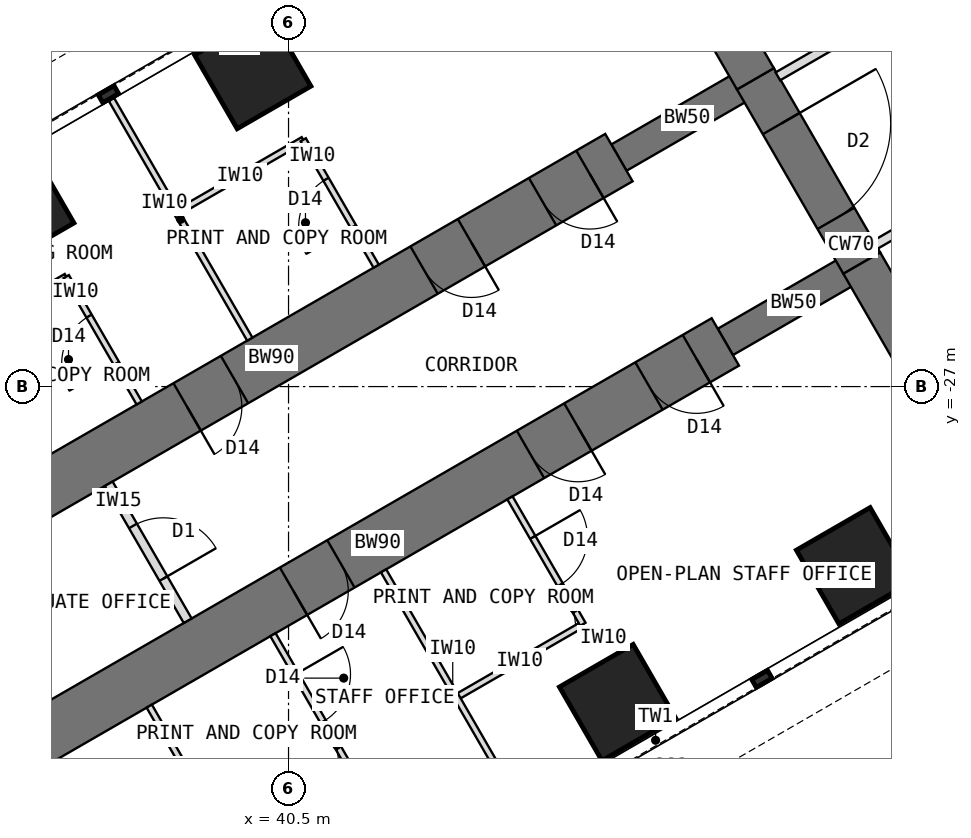
"""IFC4 building model, lengths in metres.
Left out: names, types, materials, properties, quantities, classifications, styles, units other than length and angle.
Written with IfcOpenShell. Run it as: python <this file> out.ifc"""

import sys

from ifc_helpers import new_model, si_unit, direction, frame, frame_2d, origin, origin_2d, place, context, subcontext, project, spatial, rectangle, extrude, element, fill, save


model = new_model("IFC4")
c1 = context("Model", 3, precision=1e-05, world=origin(), true_north=direction((0.0, 1.0)))
c2 = subcontext(c1, "Body", "Model", "MODEL_VIEW")
j1 = project(units=[si_unit("LENGTHUNIT", "METRE"), si_unit("PLANEANGLEUNIT", "RADIAN")], contexts=[c1])
p1 = place(None, origin())
s1 = spatial("IfcSite", under=j1, at=p1, CompositionType="ELEMENT")
p2 = place(p1, origin())
s2 = spatial("IfcBuilding", under=s1, at=p2, CompositionType="ELEMENT")
p3 = place(p2, frame((0.0, 0.0, 72.5)))
s3 = spatial("IfcBuildingStorey", under=s2, at=p3, CompositionType="ELEMENT", Elevation=72.5)
p4 = place(p3, frame((45.904, -18.0, 0.0), z_axis=(0.0, 0.0, 1.0), x_axis=(0.500024481964, -0.866011268655, 0.0)))
e1 = element("IfcWall", 1, at=p4, inside=s3, PredefinedType="SHEAR", context=c2, shape_type="SweptSolid", body=[
    extrude(rectangle(XDim=4.548, YDim=0.7, at=frame_2d((2.274, 0.0))), origin(), (0.0, 0.0, 1.0), 4.0),
])
p5 = place(p3, frame((48.178, -21.939, 0.0), z_axis=(0.0, 0.0, 1.0), x_axis=(0.500010275428, -0.866019471182, 0.0)))
e2 = element("IfcWall", 2, at=p5, inside=s3, PredefinedType="SHEAR", context=c2, shape_type="SweptSolid", body=[
    extrude(rectangle(XDim=3.5, YDim=0.7, at=frame_2d((1.75, 0.0))), origin(), (0.0, 0.0, 1.0), 4.0),
])
p6 = place(p5, frame((0.85, 0.0, 0.0)))
e3 = element("IfcOpeningElement", 3, at=p6, cuts=e2, PredefinedType="OPENING", context=c2, shape_type="SweptSolid", body=[
    extrude(rectangle(XDim=1.8, YDim=2.1, at=frame_2d((0.9, 1.05))), frame((0.0, 0.36, 0.0), z_axis=(0.0, -1.0, 0.0), x_axis=(1.0, 0.0, 0.0)), (0.0, 0.0, 1.0), 0.72),
])
p7 = place(p3, frame((49.928, -24.97, 0.0), z_axis=(0.0, 0.0, 1.0), x_axis=(0.499984222037, -0.866034513004, 0.0)))
e4 = element("IfcWall", 4, at=p7, inside=s3, PredefinedType="SHEAR", context=c2, shape_type="SweptSolid", body=[
    extrude(rectangle(XDim=4.548, YDim=0.7, at=frame_2d((2.274, 0.0))), origin(), (0.0, 0.0, 1.0), 4.0),
])
p8 = place(p3, frame((49.928, -24.97, 0.0), z_axis=(0.0, 0.0, 1.0), x_axis=(-0.866031863473, -0.499988811324, 0.0)))
e5 = element("IfcWall", 5, at=p8, inside=s3, PredefinedType="SHEAR", context=c2, shape_type="SweptSolid", body=[
    extrude(rectangle(XDim=2.592, YDim=0.5, at=frame_2d((1.296, 0.0))), origin(), (0.0, 0.0, 1.0), 4.0),
])
p9 = place(p3, frame((47.684, -26.266, 0.0), z_axis=(0.0, 0.0, 1.0), x_axis=(-0.866027579429, -0.499996231654, 0.0)))
e6 = element("IfcWall", 6, at=p9, inside=s3, PredefinedType="SHEAR", context=c2, shape_type="SweptSolid", body=[
    extrude(rectangle(XDim=13.2, YDim=0.9, at=frame_2d((6.6, 0.0))), origin(), (0.0, 0.0, 1.0), 4.0),
])
p10 = place(p9, frame((0.55, 0.0, 0.0)))
e7 = element("IfcOpeningElement", 7, at=p10, cuts=e6, PredefinedType="OPENING", context=c2, shape_type="SweptSolid", body=[
    extrude(rectangle(XDim=0.9, YDim=2.1, at=frame_2d((0.45, 1.05))), frame((0.0, 0.46, 0.0), z_axis=(0.0, -1.0, 0.0), x_axis=(1.0, 0.0, 0.0)), (0.0, 0.0, 1.0), 0.92),
])
p11 = place(p9, frame((2.8, 0.0, 0.0)))
e8 = element("IfcOpeningElement", 8, at=p11, cuts=e6, PredefinedType="OPENING", context=c2, shape_type="SweptSolid", body=[
    extrude(rectangle(XDim=0.9, YDim=2.1, at=frame_2d((0.45, 1.05))), frame((0.0, 0.46, 0.0), z_axis=(0.0, -1.0, 0.0), x_axis=(1.0, 0.0, 0.0)), (0.0, 0.0, 1.0), 0.92),
])
p12 = place(p9, frame((7.3, 0.0, 0.0)))
e9 = element("IfcOpeningElement", 9, at=p12, cuts=e6, PredefinedType="OPENING", context=c2, shape_type="SweptSolid", body=[
    extrude(rectangle(XDim=0.9, YDim=2.1, at=frame_2d((0.45, 1.05))), frame((0.0, 0.46, 0.0), z_axis=(0.0, -1.0, 0.0), x_axis=(1.0, 0.0, 0.0)), (0.0, 0.0, 1.0), 0.92),
])
p13 = place(p3, frame((48.178, -21.939, 0.0), z_axis=(0.0, 0.0, 1.0), x_axis=(-0.866072649678, -0.499918158782, 0.0)))
e10 = element("IfcWall", 10, at=p13, inside=s3, PredefinedType="SHEAR", context=c2, shape_type="SweptSolid", body=[
    extrude(rectangle(XDim=2.592, YDim=0.5, at=frame_2d((1.296, 0.0))), origin(), (0.0, 0.0, 1.0), 4.0),
])
p14 = place(p3, frame((45.934, -23.234, 0.0), z_axis=(0.0, 0.0, 1.0), x_axis=(-0.866019570528, -0.500010103361, 0.0)))
e11 = element("IfcWall", 11, at=p14, inside=s3, PredefinedType="SHEAR", context=c2, shape_type="SweptSolid", body=[
    extrude(rectangle(XDim=13.2, YDim=0.9, at=frame_2d((6.6, 0.0))), origin(), (0.0, 0.0, 1.0), 4.0),
])
p15 = place(p14, frame((0.55, 0.0, 0.0)))
e12 = element("IfcOpeningElement", 12, at=p15, cuts=e11, PredefinedType="OPENING", context=c2, shape_type="SweptSolid", body=[
    extrude(rectangle(XDim=0.9, YDim=2.1, at=frame_2d((0.45, 1.05))), frame((0.0, 0.46, 0.0), z_axis=(0.0, -1.0, 0.0), x_axis=(1.0, 0.0, 0.0)), (0.0, 0.0, 1.0), 0.92),
])
p16 = place(p14, frame((2.8, 0.0, 0.0)))
e13 = element("IfcOpeningElement", 13, at=p16, cuts=e11, PredefinedType="OPENING", context=c2, shape_type="SweptSolid", body=[
    extrude(rectangle(XDim=0.9, YDim=2.1, at=frame_2d((0.45, 1.05))), frame((0.0, 0.46, 0.0), z_axis=(0.0, -1.0, 0.0), x_axis=(1.0, 0.0, 0.0)), (0.0, 0.0, 1.0), 0.92),
])
p17 = place(p14, frame((7.3, 0.0, 0.0)))
e14 = element("IfcOpeningElement", 14, at=p17, cuts=e11, PredefinedType="OPENING", context=c2, shape_type="SweptSolid", body=[
    extrude(rectangle(XDim=0.9, YDim=2.1, at=frame_2d((0.45, 1.05))), frame((0.0, 0.46, 0.0), z_axis=(0.0, -1.0, 0.0), x_axis=(1.0, 0.0, 0.0)), (0.0, 0.0, 1.0), 0.92),
])
for number, where, z_axis, x_axis in (
    (15, (49.809, -29.946, 0.0), (0.0, 0.0, 1.0), (0.866, 0.5, 0.0)),
    (16, (45.912, -32.196, 0.0), (0.0, 0.0, 1.0), (0.866, 0.5, 0.0)),
    (17, (39.912, -21.804, 0.0), (0.0, 0.0, 1.0), (0.866, 0.5, 0.0)),
    (18, (36.014, -24.054, 0.0), (0.0, 0.0, 1.0), (0.866, 0.5, 0.0)),
):
    element("IfcColumn", number, at=place(p3, frame(where, z_axis=z_axis, x_axis=x_axis)), inside=s3, PredefinedType="COLUMN", context=c2, shape_type="SweptSolid", body=[
        extrude(rectangle(XDim=1.4, YDim=1.4, at=origin_2d()), origin(), (0.0, 0.0, 1.0), 4.0),
    ])
p18 = place(p3, frame((42.063, -30.03, 0.0), z_axis=(0.0, 0.0, 1.0), x_axis=(0.499982560684, -0.866035472144, 0.0)))
e19 = element("IfcWall", 19, at=p18, inside=s3, PredefinedType="PARTITIONING", context=c2, shape_type="SweptSolid", body=[
    extrude(rectangle(XDim=4.55, YDim=0.1, at=frame_2d((2.275, 0.0))), origin(), (0.0, 0.0, 1.0), 3.8),
])
p19 = place(p3, frame((45.342, -30.909, 0.0), z_axis=(0.0, 0.0, 1.0), x_axis=(-0.866050077142, -0.499957262057, 0.0)))
e20 = element("IfcWall", 20, at=p19, inside=s3, PredefinedType="PARTITIONING", context=c2, shape_type="SweptSolid", body=[
    extrude(rectangle(XDim=2.4, YDim=0.1, at=frame_2d((1.2, 0.0))), origin(), (0.0, 0.0, 1.0), 3.8),
])
p20 = place(p3, frame((44.141, -28.83, 0.0), z_axis=(0.0, 0.0, 1.0), x_axis=(0.500077600433, -0.865980596518, 0.0)))
e21 = element("IfcWall", 21, at=p20, inside=s3, PredefinedType="PARTITIONING", context=c2, shape_type="SweptSolid", body=[
    extrude(rectangle(XDim=2.4, YDim=0.1, at=frame_2d((1.2, 0.0))), origin(), (0.0, 0.0, 1.0), 3.8),
])
p21 = place(p20, frame((0.75, 0.0, 0.0)))
e22 = element("IfcOpeningElement", 22, at=p21, cuts=e21, PredefinedType="OPENING", context=c2, shape_type="SweptSolid", body=[
    extrude(rectangle(XDim=0.9, YDim=2.1, at=frame_2d((0.45, 1.05))), frame((0.0, 0.06, 0.0), z_axis=(0.0, -1.0, 0.0), x_axis=(1.0, 0.0, 0.0)), (0.0, 0.0, 1.0), 0.12),
])
p22 = place(p3, frame((40.244, -31.08, 0.0), z_axis=(0.0, 0.0, 1.0), x_axis=(0.500001309137, -0.866024647952, 0.0)))
e23 = element("IfcWall", 23, at=p22, inside=s3, PredefinedType="PARTITIONING", context=c2, shape_type="SweptSolid", body=[
    extrude(rectangle(XDim=2.4, YDim=0.1, at=frame_2d((1.2, 0.0))), origin(), (0.0, 0.0, 1.0), 3.8),
])
p23 = place(p22, frame((0.75, 0.0, 0.0)))
e24 = element("IfcOpeningElement", 24, at=p23, cuts=e23, PredefinedType="OPENING", context=c2, shape_type="SweptSolid", body=[
    extrude(rectangle(XDim=0.9, YDim=2.1, at=frame_2d((0.45, 1.05))), frame((0.0, 0.06, 0.0), z_axis=(0.0, -1.0, 0.0), x_axis=(1.0, 0.0, 0.0)), (0.0, 0.0, 1.0), 0.12),
])
p24 = place(p3, frame((38.209, -32.255, 0.0), z_axis=(0.0, 0.0, 1.0), x_axis=(0.500001309137, -0.866024647952, 0.0)))
e25 = element("IfcWall", 25, at=p24, inside=s3, PredefinedType="PARTITIONING", context=c2, shape_type="SweptSolid", body=[
    extrude(rectangle(XDim=2.4, YDim=0.1, at=frame_2d((1.2, 0.0))), origin(), (0.0, 0.0, 1.0), 3.8),
])
p25 = place(p3, frame((39.863, -26.22, 0.0), z_axis=(0.0, 0.0, 1.0), x_axis=(-0.500022803284, 0.866012237902, 0.0)))
e26 = element("IfcWall", 26, at=p25, inside=s3, PredefinedType="PARTITIONING", context=c2, shape_type="SweptSolid", body=[
    extrude(rectangle(XDim=4.55, YDim=0.1, at=frame_2d((2.275, 0.0))), origin(), (0.0, 0.0, 1.0), 3.8),
])
p26 = place(p3, frame((40.741, -22.941, 0.0), z_axis=(0.0, 0.0, 1.0), x_axis=(-0.865980596518, -0.500077600433, 0.0)))
e27 = element("IfcWall", 27, at=p26, inside=s3, PredefinedType="PARTITIONING", context=c2, shape_type="SweptSolid", body=[
    extrude(rectangle(XDim=2.4, YDim=0.1, at=frame_2d((1.2, 0.0))), origin(), (0.0, 0.0, 1.0), 3.8),
])
p27 = place(p3, frame((41.941, -25.02, 0.0), z_axis=(0.0, 0.0, 1.0), x_axis=(-0.499957262057, 0.866050077142, 0.0)))
e28 = element("IfcWall", 28, at=p27, inside=s3, PredefinedType="PARTITIONING", context=c2, shape_type="SweptSolid", body=[
    extrude(rectangle(XDim=2.4, YDim=0.1, at=frame_2d((1.2, 0.0))), origin(), (0.0, 0.0, 1.0), 3.8),
])
p28 = place(p27, frame((0.75, 0.0, 0.0)))
e29 = element("IfcOpeningElement", 29, at=p28, cuts=e28, PredefinedType="OPENING", context=c2, shape_type="SweptSolid", body=[
    extrude(rectangle(XDim=0.9, YDim=2.1, at=frame_2d((0.45, 1.05))), frame((0.0, 0.06, 0.0), z_axis=(0.0, -1.0, 0.0), x_axis=(1.0, 0.0, 0.0)), (0.0, 0.0, 1.0), 0.12),
])
p29 = place(p3, frame((36.844, -25.191, 0.0), z_axis=(0.0, 0.0, 1.0), x_axis=(-0.865980596518, -0.500077600433, 0.0)))
e30 = element("IfcWall", 30, at=p29, inside=s3, PredefinedType="PARTITIONING", context=c2, shape_type="SweptSolid", body=[
    extrude(rectangle(XDim=2.4, YDim=0.1, at=frame_2d((1.2, 0.0))), origin(), (0.0, 0.0, 1.0), 3.8),
])
p30 = place(p3, frame((38.044, -27.27, 0.0), z_axis=(0.0, 0.0, 1.0), x_axis=(-0.500033551112, 0.866006032174, 0.0)))
e31 = element("IfcWall", 31, at=p30, inside=s3, PredefinedType="PARTITIONING", context=c2, shape_type="SweptSolid", body=[
    extrude(rectangle(XDim=2.4, YDim=0.1, at=frame_2d((1.2, 0.0))), origin(), (0.0, 0.0, 1.0), 3.8),
])
p31 = place(p30, frame((0.75, 0.0, 0.0)))
e32 = element("IfcOpeningElement", 32, at=p31, cuts=e31, PredefinedType="OPENING", context=c2, shape_type="SweptSolid", body=[
    extrude(rectangle(XDim=0.9, YDim=2.1, at=frame_2d((0.45, 1.05))), frame((0.0, 0.06, 0.0), z_axis=(0.0, -1.0, 0.0), x_axis=(1.0, 0.0, 0.0)), (0.0, 0.0, 1.0), 0.12),
])
p32 = place(p3, frame((54.017, -22.436, 0.0), z_axis=(0.0, 0.0, 1.0), x_axis=(-0.866015446554, -0.500017246033, 0.0)))
e33 = element("IfcWall", 33, at=p32, inside=s3, PredefinedType="PARTITIONING", context=c2, shape_type="SweptSolid", body=[
    extrude(rectangle(XDim=4.469, YDim=0.15, at=frame_2d((2.234, 0.0))), origin(), (0.0, 0.0, 1.0), 3.8),
])
p33 = place(p32, frame((1.744, 0.0, 0.0)))
e34 = element("IfcOpeningElement", 34, at=p33, cuts=e33, PredefinedType="OPENING", context=c2, shape_type="SweptSolid", body=[
    extrude(rectangle(XDim=1.0, YDim=2.1, at=frame_2d((0.5, 1.05))), frame((0.0, 0.085, 0.0), z_axis=(0.0, -1.0, 0.0), x_axis=(1.0, 0.0, 0.0)), (0.0, 0.0, 1.0), 0.17),
])
p34 = place(p3, frame((48.548, -21.898, 0.0), z_axis=(0.0, 0.0, 1.0), x_axis=(0.866025445582, 0.499999927604, 0.0)))
e35 = element("IfcWall", 35, at=p34, inside=s3, PredefinedType="PARTITIONING", context=c2, shape_type="SweptSolid", body=[
    extrude(rectangle(XDim=4.468, YDim=0.15, at=frame_2d((2.234, 0.0))), origin(), (0.0, 0.0, 1.0), 3.8),
])
p35 = place(p34, frame((1.724, 0.0, 0.0)))
e36 = element("IfcOpeningElement", 36, at=p35, cuts=e35, PredefinedType="OPENING", context=c2, shape_type="SweptSolid", body=[
    extrude(rectangle(XDim=1.0, YDim=2.1, at=frame_2d((0.5, 1.05))), frame((0.0, 0.085, 0.0), z_axis=(0.0, -1.0, 0.0), x_axis=(1.0, 0.0, 0.0)), (0.0, 0.0, 1.0), 0.17),
])
p36 = place(p3, frame((37.542, -28.599, 0.0), z_axis=(0.0, 0.0, 1.0), x_axis=(0.500006934395, -0.866021400173, 0.0)))
e37 = element("IfcWall", 37, at=p36, inside=s3, PredefinedType="PARTITIONING", context=c2, shape_type="SweptSolid", body=[
    extrude(rectangle(XDim=2.6, YDim=0.15, at=frame_2d((1.3, 0.0))), origin(), (0.0, 0.0, 1.0), 3.8),
])
p37 = place(p36, frame((0.8, 0.0, 0.0)))
e38 = element("IfcOpeningElement", 38, at=p37, cuts=e37, PredefinedType="OPENING", context=c2, shape_type="SweptSolid", body=[
    extrude(rectangle(XDim=1.0, YDim=2.1, at=frame_2d((0.5, 1.05))), frame((0.0, 0.085, 0.0), z_axis=(0.0, -1.0, 0.0), x_axis=(1.0, 0.0, 0.0)), (0.0, 0.0, 1.0), 0.17),
])
p38 = place(p6, origin())
e39 = element("IfcDoor", 39, at=p38, inside=s3, OperationType="DOUBLE_DOOR_DOUBLE_SWING", PredefinedType="DOOR", context=c2, shape_type="SweptSolid", body=[
    extrude(rectangle(XDim=1.72, YDim=2.06, at=frame_2d((0.9, 1.03))), frame((0.0, 0.025, 0.0), z_axis=(0.0, -1.0, 0.0), x_axis=(1.0, 0.0, 0.0)), (0.0, 0.0, 1.0), 0.05),
    extrude(rectangle(XDim=0.04, YDim=2.1, at=frame_2d((0.02, 1.05))), frame((0.0, 0.35, 0.0), z_axis=(0.0, -1.0, 0.0), x_axis=(1.0, 0.0, 0.0)), (0.0, 0.0, 1.0), 0.699),
    extrude(rectangle(XDim=0.04, YDim=2.1, at=frame_2d((1.78, 1.05))), frame((0.0, 0.35, 0.0), z_axis=(0.0, -1.0, 0.0), x_axis=(1.0, 0.0, 0.0)), (0.0, 0.0, 1.0), 0.699),
    extrude(rectangle(XDim=1.72, YDim=0.04, at=frame_2d((0.9, 2.08))), frame((0.0, 0.35, 0.0), z_axis=(0.0, -1.0, 0.0), x_axis=(1.0, 0.0, 0.0)), (0.0, 0.0, 1.0), 0.699),
])
fill(e3, e39)
p39 = place(p21, origin())
e40 = element("IfcDoor", 40, at=p39, inside=s3, OperationType="SINGLE_SWING_LEFT", PredefinedType="DOOR", context=c2, shape_type="SweptSolid", body=[
    extrude(rectangle(XDim=0.9, YDim=2.1, at=frame_2d((0.45, 1.05))), frame((0.0, 0.025, 0.0), z_axis=(0.0, -1.0, 0.0), x_axis=(1.0, 0.0, 0.0)), (0.0, 0.0, 1.0), 0.05),
])
fill(e22, e40)
p40 = place(p23, origin())
e41 = element("IfcDoor", 41, at=p40, inside=s3, OperationType="SINGLE_SWING_LEFT", PredefinedType="DOOR", context=c2, shape_type="SweptSolid", body=[
    extrude(rectangle(XDim=0.9, YDim=2.1, at=frame_2d((0.45, 1.05))), frame((0.0, 0.025, 0.0), z_axis=(0.0, -1.0, 0.0), x_axis=(1.0, 0.0, 0.0)), (0.0, 0.0, 1.0), 0.05),
])
fill(e24, e41)
p41 = place(p28, origin())
e42 = element("IfcDoor", 42, at=p41, inside=s3, OperationType="SINGLE_SWING_LEFT", PredefinedType="DOOR", context=c2, shape_type="SweptSolid", body=[
    extrude(rectangle(XDim=0.9, YDim=2.1, at=frame_2d((0.45, 1.05))), frame((0.0, 0.025, 0.0), z_axis=(0.0, -1.0, 0.0), x_axis=(1.0, 0.0, 0.0)), (0.0, 0.0, 1.0), 0.05),
])
fill(e29, e42)
p42 = place(p31, origin())
e43 = element("IfcDoor", 43, at=p42, inside=s3, OperationType="SINGLE_SWING_LEFT", PredefinedType="DOOR", context=c2, shape_type="SweptSolid", body=[
    extrude(rectangle(XDim=0.9, YDim=2.1, at=frame_2d((0.45, 1.05))), frame((0.0, 0.025, 0.0), z_axis=(0.0, -1.0, 0.0), x_axis=(1.0, 0.0, 0.0)), (0.0, 0.0, 1.0), 0.05),
])
fill(e32, e43)
p43 = place(p37, origin())
e44 = element("IfcDoor", 44, at=p43, inside=s3, OperationType="SINGLE_SWING_RIGHT", PredefinedType="DOOR", context=c2, shape_type="SweptSolid", body=[
    extrude(rectangle(XDim=1.0, YDim=2.1, at=frame_2d((0.5, 1.05))), frame((0.0, 0.025, 0.0), z_axis=(0.0, -1.0, 0.0), x_axis=(1.0, 0.0, 0.0)), (0.0, 0.0, 1.0), 0.05),
])
fill(e38, e44)
p44 = place(p10, origin())
e45 = element("IfcDoor", 45, at=p44, inside=s3, OperationType="SINGLE_SWING_LEFT", PredefinedType="DOOR", context=c2, shape_type="SweptSolid", body=[
    extrude(rectangle(XDim=0.82, YDim=2.06, at=frame_2d((0.45, 1.03))), frame((0.0, 0.025, 0.0), z_axis=(0.0, -1.0, 0.0), x_axis=(1.0, 0.0, 0.0)), (0.0, 0.0, 1.0), 0.05),
    extrude(rectangle(XDim=0.04, YDim=2.1, at=frame_2d((0.02, 1.05))), frame((0.0, 0.45, 0.0), z_axis=(0.0, -1.0, 0.0), x_axis=(1.0, 0.0, 0.0)), (0.0, 0.0, 1.0), 0.899),
    extrude(rectangle(XDim=0.04, YDim=2.1, at=frame_2d((0.88, 1.05))), frame((0.0, 0.45, 0.0), z_axis=(0.0, -1.0, 0.0), x_axis=(1.0, 0.0, 0.0)), (0.0, 0.0, 1.0), 0.899),
    extrude(rectangle(XDim=0.82, YDim=0.04, at=frame_2d((0.45, 2.08))), frame((0.0, 0.45, 0.0), z_axis=(0.0, -1.0, 0.0), x_axis=(1.0, 0.0, 0.0)), (0.0, 0.0, 1.0), 0.899),
])
fill(e7, e45)
p45 = place(p11, origin())
e46 = element("IfcDoor", 46, at=p45, inside=s3, OperationType="SINGLE_SWING_LEFT", PredefinedType="DOOR", context=c2, shape_type="SweptSolid", body=[
    extrude(rectangle(XDim=0.82, YDim=2.06, at=frame_2d((0.45, 1.03))), frame((0.0, 0.025, 0.0), z_axis=(0.0, -1.0, 0.0), x_axis=(1.0, 0.0, 0.0)), (0.0, 0.0, 1.0), 0.05),
    extrude(rectangle(XDim=0.04, YDim=2.1, at=frame_2d((0.02, 1.05))), frame((0.0, 0.45, 0.0), z_axis=(0.0, -1.0, 0.0), x_axis=(1.0, 0.0, 0.0)), (0.0, 0.0, 1.0), 0.899),
    extrude(rectangle(XDim=0.04, YDim=2.1, at=frame_2d((0.88, 1.05))), frame((0.0, 0.45, 0.0), z_axis=(0.0, -1.0, 0.0), x_axis=(1.0, 0.0, 0.0)), (0.0, 0.0, 1.0), 0.899),
    extrude(rectangle(XDim=0.82, YDim=0.04, at=frame_2d((0.45, 2.08))), frame((0.0, 0.45, 0.0), z_axis=(0.0, -1.0, 0.0), x_axis=(1.0, 0.0, 0.0)), (0.0, 0.0, 1.0), 0.899),
])
fill(e8, e46)
p46 = place(p12, origin())
e47 = element("IfcDoor", 47, at=p46, inside=s3, OperationType="SINGLE_SWING_RIGHT", PredefinedType="DOOR", context=c2, shape_type="SweptSolid", body=[
    extrude(rectangle(XDim=0.82, YDim=2.06, at=frame_2d((0.45, 1.03))), frame((0.0, 0.025, 0.0), z_axis=(0.0, -1.0, 0.0), x_axis=(1.0, 0.0, 0.0)), (0.0, 0.0, 1.0), 0.05),
    extrude(rectangle(XDim=0.04, YDim=2.1, at=frame_2d((0.02, 1.05))), frame((0.0, 0.45, 0.0), z_axis=(0.0, -1.0, 0.0), x_axis=(1.0, 0.0, 0.0)), (0.0, 0.0, 1.0), 0.899),
    extrude(rectangle(XDim=0.04, YDim=2.1, at=frame_2d((0.88, 1.05))), frame((0.0, 0.45, 0.0), z_axis=(0.0, -1.0, 0.0), x_axis=(1.0, 0.0, 0.0)), (0.0, 0.0, 1.0), 0.899),
    extrude(rectangle(XDim=0.82, YDim=0.04, at=frame_2d((0.45, 2.08))), frame((0.0, 0.45, 0.0), z_axis=(0.0, -1.0, 0.0), x_axis=(1.0, 0.0, 0.0)), (0.0, 0.0, 1.0), 0.899),
])
fill(e9, e47)
p47 = place(p15, origin())
e48 = element("IfcDoor", 48, at=p47, inside=s3, OperationType="SINGLE_SWING_LEFT", PredefinedType="DOOR", context=c2, shape_type="SweptSolid", body=[
    extrude(rectangle(XDim=0.82, YDim=2.06, at=frame_2d((0.45, 1.03))), frame((0.0, 0.025, 0.0), z_axis=(0.0, -1.0, 0.0), x_axis=(1.0, 0.0, 0.0)), (0.0, 0.0, 1.0), 0.05),
    extrude(rectangle(XDim=0.04, YDim=2.1, at=frame_2d((0.02, 1.05))), frame((0.0, 0.45, 0.0), z_axis=(0.0, -1.0, 0.0), x_axis=(1.0, 0.0, 0.0)), (0.0, 0.0, 1.0), 0.899),
    extrude(rectangle(XDim=0.04, YDim=2.1, at=frame_2d((0.88, 1.05))), frame((0.0, 0.45, 0.0), z_axis=(0.0, -1.0, 0.0), x_axis=(1.0, 0.0, 0.0)), (0.0, 0.0, 1.0), 0.899),
    extrude(rectangle(XDim=0.82, YDim=0.04, at=frame_2d((0.45, 2.08))), frame((0.0, 0.45, 0.0), z_axis=(0.0, -1.0, 0.0), x_axis=(1.0, 0.0, 0.0)), (0.0, 0.0, 1.0), 0.899),
])
fill(e12, e48)
p48 = place(p16, origin())
e49 = element("IfcDoor", 49, at=p48, inside=s3, OperationType="SINGLE_SWING_LEFT", PredefinedType="DOOR", context=c2, shape_type="SweptSolid", body=[
    extrude(rectangle(XDim=0.82, YDim=2.06, at=frame_2d((0.45, 1.03))), frame((0.0, 0.025, 0.0), z_axis=(0.0, -1.0, 0.0), x_axis=(1.0, 0.0, 0.0)), (0.0, 0.0, 1.0), 0.05),
    extrude(rectangle(XDim=0.04, YDim=2.1, at=frame_2d((0.02, 1.05))), frame((0.0, 0.45, 0.0), z_axis=(0.0, -1.0, 0.0), x_axis=(1.0, 0.0, 0.0)), (0.0, 0.0, 1.0), 0.899),
    extrude(rectangle(XDim=0.04, YDim=2.1, at=frame_2d((0.88, 1.05))), frame((0.0, 0.45, 0.0), z_axis=(0.0, -1.0, 0.0), x_axis=(1.0, 0.0, 0.0)), (0.0, 0.0, 1.0), 0.899),
    extrude(rectangle(XDim=0.82, YDim=0.04, at=frame_2d((0.45, 2.08))), frame((0.0, 0.45, 0.0), z_axis=(0.0, -1.0, 0.0), x_axis=(1.0, 0.0, 0.0)), (0.0, 0.0, 1.0), 0.899),
])
fill(e13, e49)
p49 = place(p17, origin())
e50 = element("IfcDoor", 50, at=p49, inside=s3, OperationType="SINGLE_SWING_RIGHT", PredefinedType="DOOR", context=c2, shape_type="SweptSolid", body=[
    extrude(rectangle(XDim=0.82, YDim=2.06, at=frame_2d((0.45, 1.03))), frame((0.0, 0.025, 0.0), z_axis=(0.0, -1.0, 0.0), x_axis=(1.0, 0.0, 0.0)), (0.0, 0.0, 1.0), 0.05),
    extrude(rectangle(XDim=0.04, YDim=2.1, at=frame_2d((0.02, 1.05))), frame((0.0, 0.45, 0.0), z_axis=(0.0, -1.0, 0.0), x_axis=(1.0, 0.0, 0.0)), (0.0, 0.0, 1.0), 0.899),
    extrude(rectangle(XDim=0.04, YDim=2.1, at=frame_2d((0.88, 1.05))), frame((0.0, 0.45, 0.0), z_axis=(0.0, -1.0, 0.0), x_axis=(1.0, 0.0, 0.0)), (0.0, 0.0, 1.0), 0.899),
    extrude(rectangle(XDim=0.82, YDim=0.04, at=frame_2d((0.45, 2.08))), frame((0.0, 0.45, 0.0), z_axis=(0.0, -1.0, 0.0), x_axis=(1.0, 0.0, 0.0)), (0.0, 0.0, 1.0), 0.899),
])
fill(e14, e50)
save(model, sys.argv[1])
